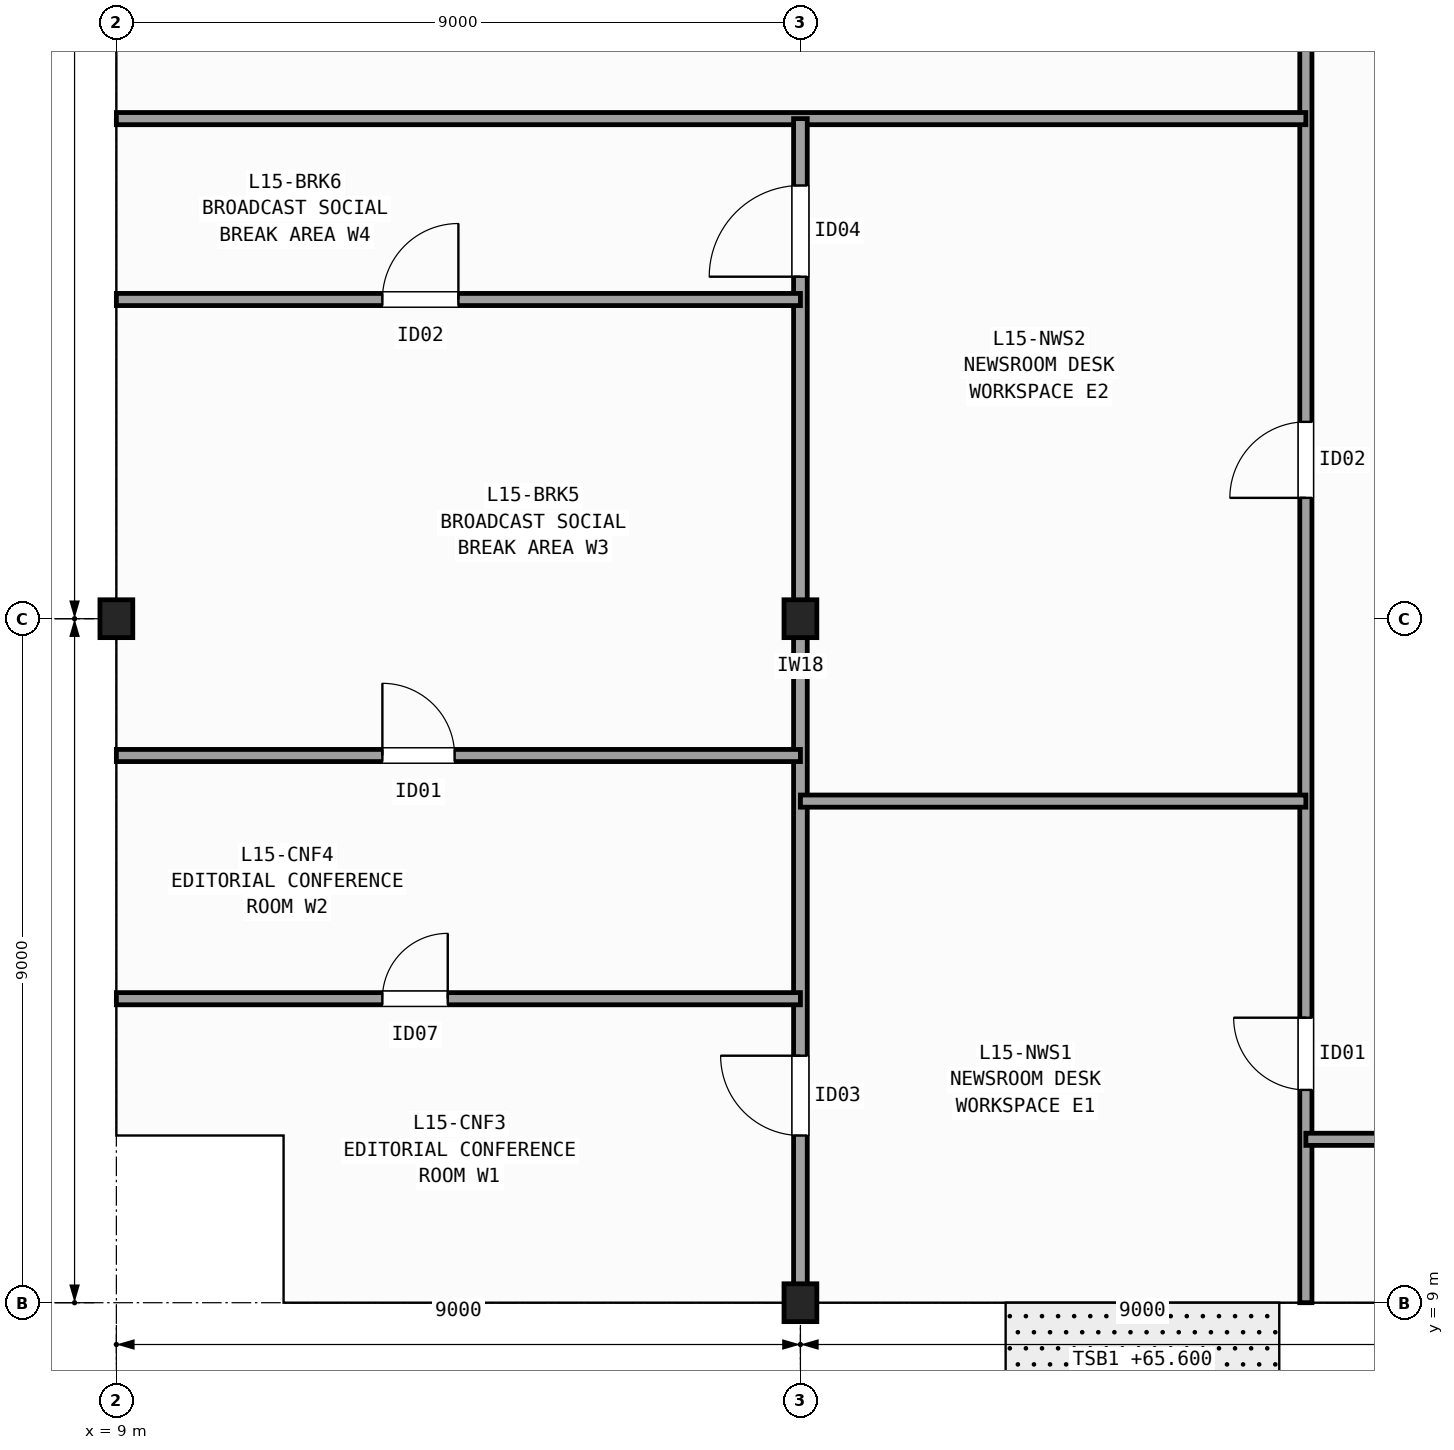
"""IFC4 building model, lengths in metres.
Left out: names, types, materials, properties, quantities, classifications, styles, units other than length and angle.
Written with IfcOpenShell. Run it as: python <this file> out.ifc"""

import sys

from ifc_helpers import new_model, si_unit, direction, frame, frame_2d, origin, origin_2d, place, context, subcontext, project, spatial, rectangle, i_section, extrude, element, fill, save


model = new_model("IFC4")
c1 = context("Model", 3, precision=1e-05, world=origin(), true_north=direction((0.0, 1.0)))
c2 = subcontext(c1, "Body", "Model", "MODEL_VIEW")
j1 = project(units=[si_unit("LENGTHUNIT", "METRE"), si_unit("PLANEANGLEUNIT", "RADIAN")], contexts=[c1])
p1 = place(None, origin())
s1 = spatial("IfcSite", under=j1, at=p1, CompositionType="ELEMENT")
p2 = place(p1, origin())
s2 = spatial("IfcBuilding", under=s1, at=p2, CompositionType="ELEMENT")
p3 = place(p2, frame((0.0, 0.0, 65.6)))
s3 = spatial("IfcBuildingStorey", under=s2, at=p3, CompositionType="ELEMENT", Elevation=65.6)
for number, where, z_axis, x_axis in (
    (1, (9.0, 18.0, 0.0), (0.0, 0.0, 1.0), (1.0, 0.0, 0.0)),
    (2, (18.0, 9.0, 0.0), (0.0, 0.0, 1.0), (1.0, 0.0, 0.0)),
    (3, (18.0, 18.0, 0.0), (0.0, 0.0, 1.0), (1.0, 0.0, 0.0)),
):
    element("IfcColumn", number, at=place(p3, frame(where, z_axis=z_axis, x_axis=x_axis)), inside=s3, PredefinedType="COLUMN", context=c2, shape_type="SweptSolid", body=[
        extrude(i_section(OverallWidth=0.432, OverallDepth=0.498, WebThickness=0.056, FlangeThickness=0.089, FilletRadius=0.015, at=origin_2d()), origin(), (0.0, 0.0, 1.0), 3.7),
    ])
p4 = place(p3, frame((24.65, 9.0, 0.0), z_axis=(0.0, 0.0, 1.0), x_axis=(0.0, 1.0, 0.0)))
e4 = element("IfcWall", 4, at=p4, inside=s3, PredefinedType="PARTITIONING", context=c2, shape_type="SweptSolid", body=[
    extrude(rectangle(XDim=19.2, YDim=0.16, at=frame_2d((9.6, 0.0))), origin(), (0.0, 0.0, 1.0), 2.627),
])
p5 = place(p4, frame((2.8, 0.0, 0.0)))
e5 = element("IfcOpeningElement", 5, at=p5, cuts=e4, PredefinedType="OPENING", context=c2, shape_type="SweptSolid", body=[
    extrude(rectangle(XDim=0.95, YDim=2.1, at=frame_2d((0.475, 1.05))), frame((0.0, 0.09, 0.0), z_axis=(0.0, -1.0, 0.0), x_axis=(1.0, 0.0, 0.0)), (0.0, 0.0, 1.0), 0.18),
])
p6 = place(p4, frame((10.59, 0.0, 0.0)))
e6 = element("IfcOpeningElement", 6, at=p6, cuts=e4, PredefinedType="OPENING", context=c2, shape_type="SweptSolid", body=[
    extrude(rectangle(XDim=1.0, YDim=2.1, at=frame_2d((0.5, 1.05))), frame((0.0, 0.09, 0.0), z_axis=(0.0, -1.0, 0.0), x_axis=(1.0, 0.0, 0.0)), (0.0, 0.0, 1.0), 0.18),
])
p7 = place(p3, frame((9.0, 24.58, 0.0), z_axis=(0.0, 0.0, 1.0), x_axis=(1.0, 0.0, 0.0)))
e7 = element("IfcWall", 7, at=p7, inside=s3, PredefinedType="PARTITIONING", context=c2, shape_type="SweptSolid", body=[
    extrude(rectangle(XDim=15.65, YDim=0.16, at=frame_2d((7.825, 0.0))), origin(), (0.0, 0.0, 1.0), 2.627),
])
p8 = place(p3, frame((18.0, 9.0, 0.0), z_axis=(0.0, 0.0, 1.0), x_axis=(0.0, 1.0, 0.0)))
e8 = element("IfcWall", 8, at=p8, inside=s3, PredefinedType="PARTITIONING", context=c2, shape_type="SweptSolid", body=[
    extrude(rectangle(XDim=15.58, YDim=0.18, at=frame_2d((7.79, 0.0))), origin(), (0.0, 0.0, 1.0), 2.627),
])
p9 = place(p8, frame((2.2, 0.0, 0.0)))
e9 = element("IfcOpeningElement", 9, at=p9, cuts=e8, PredefinedType="OPENING", context=c2, shape_type="SweptSolid", body=[
    extrude(rectangle(XDim=1.05, YDim=2.15, at=frame_2d((0.525, 1.075))), frame((0.0, 0.1, 0.0), z_axis=(0.0, -1.0, 0.0), x_axis=(1.0, 0.0, 0.0)), (0.0, 0.0, 1.0), 0.2),
])
p10 = place(p8, frame((13.5, 0.0, 0.0)))
e10 = element("IfcOpeningElement", 10, at=p10, cuts=e8, PredefinedType="OPENING", context=c2, shape_type="SweptSolid", body=[
    extrude(rectangle(XDim=1.2, YDim=2.15, at=frame_2d((0.6, 1.075))), frame((0.0, 0.1, 0.0), z_axis=(0.0, -1.0, 0.0), x_axis=(1.0, 0.0, 0.0)), (0.0, 0.0, 1.0), 0.2),
])
p11 = place(p3, frame((18.0, 15.6, 0.0), z_axis=(0.0, 0.0, 1.0), x_axis=(1.0, 0.0, 0.0)))
e11 = element("IfcWall", 11, at=p11, inside=s3, PredefinedType="PARTITIONING", context=c2, shape_type="SweptSolid", body=[
    extrude(rectangle(XDim=6.65, YDim=0.16, at=frame_2d((3.325, 0.0))), origin(), (0.0, 0.0, 1.0), 2.789),
])
p12 = place(p3, frame((9.0, 13.0, 0.0), z_axis=(0.0, 0.0, 1.0), x_axis=(1.0, 0.0, 0.0)))
e12 = element("IfcWall", 12, at=p12, inside=s3, PredefinedType="PARTITIONING", context=c2, shape_type="SweptSolid", body=[
    extrude(rectangle(XDim=9.0, YDim=0.16, at=frame_2d((4.5, 0.0))), origin(), (0.0, 0.0, 1.0), 2.792),
])
p13 = place(p12, frame((3.5, 0.0, 0.0)))
e13 = element("IfcOpeningElement", 13, at=p13, cuts=e12, PredefinedType="OPENING", context=c2, shape_type="SweptSolid", body=[
    extrude(rectangle(XDim=0.86, YDim=2.05, at=frame_2d((0.43, 1.025))), frame((0.0, 0.09, 0.0), z_axis=(0.0, -1.0, 0.0), x_axis=(1.0, 0.0, 0.0)), (0.0, 0.0, 1.0), 0.18),
])
p14 = place(p3, frame((9.0, 16.2, 0.0), z_axis=(0.0, 0.0, 1.0), x_axis=(1.0, 0.0, 0.0)))
e14 = element("IfcWall", 14, at=p14, inside=s3, PredefinedType="PARTITIONING", context=c2, shape_type="SweptSolid", body=[
    extrude(rectangle(XDim=9.0, YDim=0.16, at=frame_2d((4.5, 0.0))), origin(), (0.0, 0.0, 1.0), 2.792),
])
p15 = place(p14, frame((3.5, 0.0, 0.0)))
e15 = element("IfcOpeningElement", 15, at=p15, cuts=e14, PredefinedType="OPENING", context=c2, shape_type="SweptSolid", body=[
    extrude(rectangle(XDim=0.95, YDim=2.1, at=frame_2d((0.475, 1.05))), frame((0.0, 0.09, 0.0), z_axis=(0.0, -1.0, 0.0), x_axis=(1.0, 0.0, 0.0)), (0.0, 0.0, 1.0), 0.18),
])
p16 = place(p3, frame((9.0, 22.2, 0.0), z_axis=(0.0, 0.0, 1.0), x_axis=(1.0, 0.0, 0.0)))
e16 = element("IfcWall", 16, at=p16, inside=s3, PredefinedType="PARTITIONING", context=c2, shape_type="SweptSolid", body=[
    extrude(rectangle(XDim=9.0, YDim=0.16, at=frame_2d((4.5, 0.0))), origin(), (0.0, 0.0, 1.0), 2.627),
])
p17 = place(p16, frame((3.5, 0.0, 0.0)))
e17 = element("IfcOpeningElement", 17, at=p17, cuts=e16, PredefinedType="OPENING", context=c2, shape_type="SweptSolid", body=[
    extrude(rectangle(XDim=1.0, YDim=2.1, at=frame_2d((0.5, 1.05))), frame((0.0, 0.09, 0.0), z_axis=(0.0, -1.0, 0.0), x_axis=(1.0, 0.0, 0.0)), (0.0, 0.0, 1.0), 0.18),
])
p18 = place(p3, frame((24.65, 11.15, 0.0), z_axis=(0.0, 0.0, 1.0), x_axis=(1.0, 0.0, 0.0)))
e18 = element("IfcWall", 18, at=p18, inside=s3, PredefinedType="PARTITIONING", context=c2, shape_type="SweptSolid", body=[
    extrude(rectangle(XDim=4.75, YDim=0.16, at=frame_2d((2.375, 0.0))), origin(), (0.0, 0.0, 1.0), 2.792),
])
p19 = place(p18, frame((1.2, 0.0, 0.0)))
e19 = element("IfcOpeningElement", 19, at=p19, cuts=e18, PredefinedType="OPENING", context=c2, shape_type="SweptSolid", body=[
    extrude(rectangle(XDim=0.95, YDim=2.1, at=frame_2d((0.475, 1.05))), frame((0.0, 0.09, 0.0), z_axis=(0.0, -1.0, 0.0), x_axis=(1.0, 0.0, 0.0)), (0.0, 0.0, 1.0), 0.18),
])
p20 = place(p5, origin())
e20 = element("IfcDoor", 20, at=p20, inside=s3, OperationType="SINGLE_SWING_RIGHT", PredefinedType="DOOR", context=c2, shape_type="SweptSolid", body=[
    extrude(rectangle(XDim=0.95, YDim=2.1, at=frame_2d((0.475, 1.05))), frame((0.0, 0.025, 0.0), z_axis=(0.0, -1.0, 0.0), x_axis=(1.0, 0.0, 0.0)), (0.0, 0.0, 1.0), 0.05),
])
fill(e5, e20)
p21 = place(p6, origin())
e21 = element("IfcDoor", 21, at=p21, inside=s3, OperationType="SINGLE_SWING_LEFT", PredefinedType="DOOR", context=c2, shape_type="SweptSolid", body=[
    extrude(rectangle(XDim=1.0, YDim=2.1, at=frame_2d((0.5, 1.05))), frame((0.0, 0.025, 0.0), z_axis=(0.0, -1.0, 0.0), x_axis=(1.0, 0.0, 0.0)), (0.0, 0.0, 1.0), 0.05),
])
fill(e6, e21)
p22 = place(p9, origin())
e22 = element("IfcDoor", 22, at=p22, inside=s3, OperationType="SINGLE_SWING_RIGHT", PredefinedType="DOOR", context=c2, shape_type="SweptSolid", body=[
    extrude(rectangle(XDim=1.05, YDim=2.15, at=frame_2d((0.525, 1.075))), frame((0.0, 0.025, 0.0), z_axis=(0.0, -1.0, 0.0), x_axis=(1.0, 0.0, 0.0)), (0.0, 0.0, 1.0), 0.05),
])
fill(e9, e22)
p23 = place(p10, origin())
e23 = element("IfcDoor", 23, at=p23, inside=s3, OperationType="SINGLE_SWING_LEFT", PredefinedType="DOOR", context=c2, shape_type="SweptSolid", body=[
    extrude(rectangle(XDim=1.2, YDim=2.15, at=frame_2d((0.6, 1.075))), frame((0.0, 0.025, 0.0), z_axis=(0.0, -1.0, 0.0), x_axis=(1.0, 0.0, 0.0)), (0.0, 0.0, 1.0), 0.05),
])
fill(e10, e23)
p24 = place(p13, origin())
e24 = element("IfcDoor", 24, at=p24, inside=s3, OperationType="SINGLE_SWING_RIGHT", PredefinedType="DOOR", context=c2, shape_type="SweptSolid", body=[
    extrude(rectangle(XDim=0.86, YDim=2.05, at=frame_2d((0.43, 1.025))), frame((0.0, 0.025, 0.0), z_axis=(0.0, -1.0, 0.0), x_axis=(1.0, 0.0, 0.0)), (0.0, 0.0, 1.0), 0.05),
])
fill(e13, e24)
p25 = place(p15, origin())
e25 = element("IfcDoor", 25, at=p25, inside=s3, OperationType="SINGLE_SWING_LEFT", PredefinedType="DOOR", context=c2, shape_type="SweptSolid", body=[
    extrude(rectangle(XDim=0.95, YDim=2.1, at=frame_2d((0.475, 1.05))), frame((0.0, 0.025, 0.0), z_axis=(0.0, -1.0, 0.0), x_axis=(1.0, 0.0, 0.0)), (0.0, 0.0, 1.0), 0.05),
])
fill(e15, e25)
p26 = place(p17, origin())
e26 = element("IfcDoor", 26, at=p26, inside=s3, OperationType="SINGLE_SWING_RIGHT", PredefinedType="DOOR", context=c2, shape_type="SweptSolid", body=[
    extrude(rectangle(XDim=1.0, YDim=2.1, at=frame_2d((0.5, 1.05))), frame((0.0, 0.025, 0.0), z_axis=(0.0, -1.0, 0.0), x_axis=(1.0, 0.0, 0.0)), (0.0, 0.0, 1.0), 0.05),
])
fill(e17, e26)
save(model, sys.argv[1])
